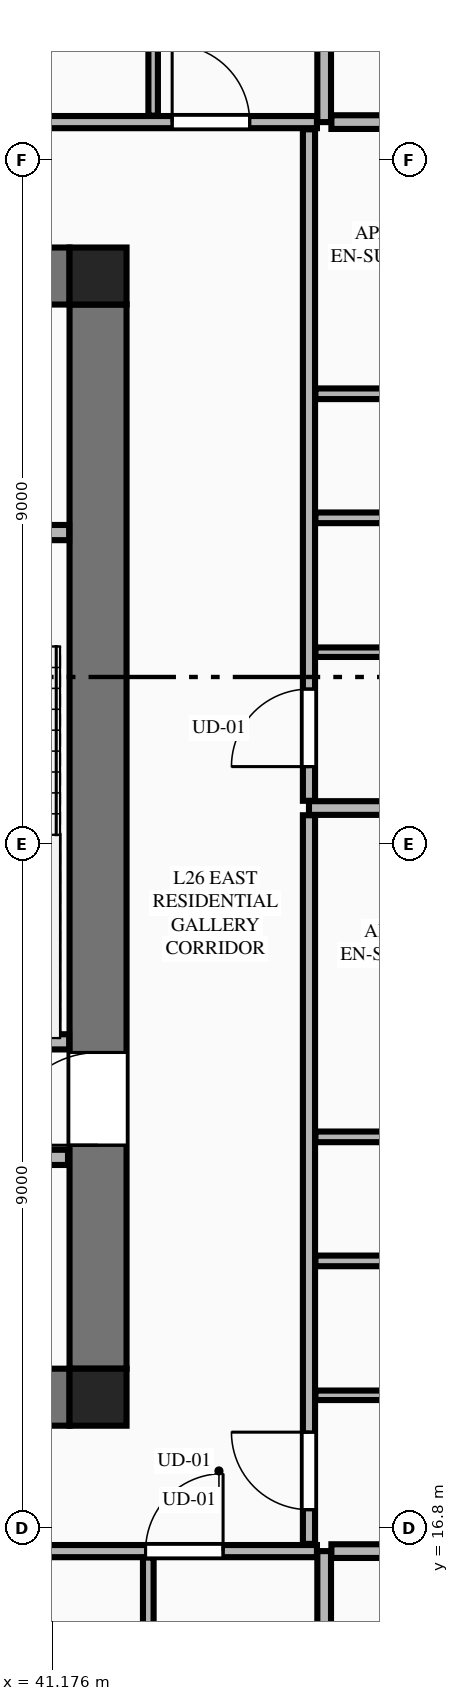
"""IFC4 building model, lengths in metres.
Left out: names, types, materials, properties, quantities, classifications, styles, units other than length and angle.
Written with IfcOpenShell. Run it as: python <this file> out.ifc"""

import sys

from ifc_helpers import new_model, si_unit, direction, frame, frame_2d, origin, origin_2d, place, context, subcontext, project, spatial, rectangle, extrude, element, fill, save


model = new_model("IFC4")
c1 = context("Model", 3, precision=1e-05, world=origin(), true_north=direction((0.0, 1.0)))
c2 = subcontext(c1, "Body", "Model", "MODEL_VIEW")
j1 = project(units=[si_unit("LENGTHUNIT", "METRE"), si_unit("PLANEANGLEUNIT", "RADIAN")], contexts=[c1])
p1 = place(None, origin())
s1 = spatial("IfcSite", under=j1, at=p1, CompositionType="ELEMENT")
p2 = place(p1, origin())
s2 = spatial("IfcBuilding", under=s1, at=p2, CompositionType="ELEMENT")
p3 = place(p2, frame((0.0, 0.0, 101.95)))
s3 = spatial("IfcBuildingStorey", under=s2, at=p3, CompositionType="ELEMENT", Elevation=101.95)
for number, where, z_axis, x_axis in (
    (1, (41.775, 18.525, 0.0), (0.0, 0.0, 1.0), (1.0, 0.0, 0.0)),
    (2, (41.775, 33.275, 0.0), (0.0, 0.0, 1.0), (1.0, 0.0, 0.0)),
):
    element("IfcColumn", number, at=place(p3, frame(where, z_axis=z_axis, x_axis=x_axis)), inside=s3, PredefinedType="COLUMN", context=c2, shape_type="SweptSolid", body=[
        extrude(rectangle(XDim=0.75, YDim=0.75, at=origin_2d()), origin(), (0.0, 0.0, 1.0), 3.55),
    ])
for number, where, z_axis, x_axis in (
    (3, (23.4, 18.525, 0.0), (0.0, 0.0, 1.0), (1.0, 0.0, 0.0)),
    (4, (23.4, 33.275, 0.0), (0.0, 0.0, 1.0), (1.0, 0.0, 0.0)),
):
    element("IfcWall", number, at=place(p3, frame(where, z_axis=z_axis, x_axis=x_axis)), inside=s3, PredefinedType="SHEAR", context=c2, shape_type="SweptSolid", body=[
        extrude(rectangle(XDim=18.0, YDim=0.75, at=frame_2d((9.0, 0.0))), origin(), (0.0, 0.0, 1.0), 3.34),
    ])
p4 = place(p3, frame((41.775, 18.9, 0.0), z_axis=(0.0, 0.0, 1.0), x_axis=(0.0, 1.0, 0.0)))
e5 = element("IfcWall", 5, at=p4, inside=s3, PredefinedType="SHEAR", context=c2, shape_type="SweptSolid", body=[
    extrude(rectangle(XDim=14.0, YDim=0.75, at=frame_2d((7.0, 0.0))), origin(), (0.0, 0.0, 1.0), 3.34),
])
p5 = place(p4, frame((2.94, 0.0, 0.0)))
e6 = element("IfcOpeningElement", 6, at=p5, cuts=e5, PredefinedType="OPENING", context=c2, shape_type="SweptSolid", body=[
    extrude(rectangle(XDim=1.22, YDim=2.25, at=frame_2d((0.61, 1.125))), frame((0.0, 0.385, 0.0), z_axis=(0.0, -1.0, 0.0), x_axis=(1.0, 0.0, 0.0)), (0.0, 0.0, 1.0), 0.77),
])
p6 = place(p3, frame((38.125, 23.2, 0.0), z_axis=(0.0, 0.0, 1.0), x_axis=(1.0, 0.0, 0.0)))
e7 = element("IfcWall", 7, at=p6, inside=s3, PredefinedType="PLUMBINGWALL", context=c2, shape_type="SweptSolid", body=[
    extrude(rectangle(XDim=3.27, YDim=0.2, at=frame_2d((1.635, 0.0))), origin(), (0.0, 0.0, 1.0), 3.34),
])
p7 = place(p3, frame((38.125, 29.9, 0.0), z_axis=(0.0, 0.0, 1.0), x_axis=(1.0, 0.0, 0.0)))
e8 = element("IfcWall", 8, at=p7, inside=s3, PredefinedType="PLUMBINGWALL", context=c2, shape_type="SweptSolid", body=[
    extrude(rectangle(XDim=3.27, YDim=0.2, at=frame_2d((1.635, 0.0))), origin(), (0.0, 0.0, 1.0), 3.34),
])
p8 = place(p7, frame((0.5, 0.0, 0.0)))
e9 = element("IfcOpeningElement", 9, at=p8, cuts=e8, PredefinedType="OPENING", context=c2, shape_type="SweptSolid", body=[
    extrude(rectangle(XDim=0.85, YDim=2.05, at=frame_2d((0.425, 1.025))), frame((0.0, 0.11, 0.0), z_axis=(0.0, -1.0, 0.0), x_axis=(1.0, 0.0, 0.0)), (0.0, 0.0, 1.0), 0.22),
])
p9 = place(p3, frame((23.42, 21.68, 0.0), z_axis=(0.0, 0.0, 1.0), x_axis=(1.0, 0.0, 0.0)))
e10 = element("IfcWall", 10, at=p9, inside=s3, PredefinedType="PLUMBINGWALL", context=c2, shape_type="SweptSolid", body=[
    extrude(rectangle(XDim=17.96, YDim=0.2, at=frame_2d((8.98, 0.0))), origin(), (0.0, 0.0, 1.0), 3.34),
])
p10 = place(p9, frame((11.6, 0.0, 0.0)))
e11 = element("IfcOpeningElement", 11, at=p10, cuts=e10, PredefinedType="OPENING", context=c2, shape_type="SweptSolid", body=[
    extrude(rectangle(XDim=1.1, YDim=2.2, at=frame_2d((0.55, 1.1))), frame((0.0, 0.11, 0.0), z_axis=(0.0, -1.0, 0.0), x_axis=(1.0, 0.0, 0.0)), (0.0, 0.0, 1.0), 0.22),
])
p11 = place(p9, frame((0.41, 0.0, 0.0)))
e12 = element("IfcOpeningElement", 12, at=p11, cuts=e10, PredefinedType="OPENING", context=c2, shape_type="SweptSolid", body=[
    extrude(rectangle(XDim=0.85, YDim=2.05, at=frame_2d((0.425, 1.025))), frame((0.0, 0.11, 0.0), z_axis=(0.0, -1.0, 0.0), x_axis=(1.0, 0.0, 0.0)), (0.0, 0.0, 1.0), 0.22),
])
p12 = place(p9, frame((6.03, 0.0, 0.0)))
e13 = element("IfcOpeningElement", 13, at=p12, cuts=e10, PredefinedType="OPENING", context=c2, shape_type="SweptSolid", body=[
    extrude(rectangle(XDim=0.85, YDim=2.05, at=frame_2d((0.425, 1.025))), frame((0.0, 0.11, 0.0), z_axis=(0.0, -1.0, 0.0), x_axis=(1.0, 0.0, 0.0)), (0.0, 0.0, 1.0), 0.22),
])
p13 = place(p9, frame((13.78, 0.0, 0.0)))
e14 = element("IfcOpeningElement", 14, at=p13, cuts=e10, PredefinedType="OPENING", context=c2, shape_type="SweptSolid", body=[
    extrude(rectangle(XDim=0.85, YDim=2.05, at=frame_2d((0.425, 1.025))), frame((0.0, 0.11, 0.0), z_axis=(0.0, -1.0, 0.0), x_axis=(1.0, 0.0, 0.0)), (0.0, 0.0, 1.0), 0.22),
])
p14 = place(p3, frame((44.75, 4.105, 0.0), z_axis=(0.0, 0.0, 1.0), x_axis=(0.0, 1.0, 0.0)))
e15 = element("IfcWall", 15, at=p14, inside=s3, PredefinedType="PARTITIONING", context=c2, shape_type="SweptSolid", body=[
    extrude(rectangle(XDim=12.395, YDim=0.18, at=frame_2d((6.198, 0.0))), origin(), (0.0, 0.0, 1.0), 3.34),
])
p15 = place(p3, frame((36.327, 16.5, 0.0), z_axis=(0.0, 0.0, 1.0), x_axis=(1.0, 0.0, 0.0)))
e16 = element("IfcWall", 16, at=p15, inside=s3, PredefinedType="PARTITIONING", context=c2, shape_type="SweptSolid", body=[
    extrude(rectangle(XDim=8.328, YDim=0.16, at=frame_2d((4.164, 0.0))), origin(), (0.0, 0.0, 1.0), 3.34),
])
p16 = place(p15, frame((6.073, 0.0, 0.0)))
e17 = element("IfcOpeningElement", 17, at=p16, cuts=e16, PredefinedType="OPENING", context=c2, shape_type="SweptSolid", body=[
    extrude(rectangle(XDim=1.02, YDim=2.25, at=frame_2d((0.51, 1.125))), frame((0.0, 0.09, 0.0), z_axis=(0.0, -1.0, 0.0), x_axis=(1.0, 0.0, 0.0)), (0.0, 0.0, 1.0), 0.18),
])
p17 = place(p3, frame((42.436, 10.036, 0.0), z_axis=(0.0, 0.0, 1.0), x_axis=(0.0, 1.0, 0.0)))
e18 = element("IfcWall", 18, at=p17, inside=s3, PredefinedType="PLUMBINGWALL", context=c2, shape_type="SweptSolid", body=[
    extrude(rectangle(XDim=6.379, YDim=0.14, at=frame_2d((3.189, 0.0))), origin(), (0.0, 0.0, 1.0), 2.722),
])
p18 = place(p3, frame((44.75, 35.3, 0.0), z_axis=(0.0, 0.0, 1.0), x_axis=(0.0, 1.0, 0.0)))
e19 = element("IfcWall", 19, at=p18, inside=s3, PredefinedType="PARTITIONING", context=c2, shape_type="SweptSolid", body=[
    extrude(rectangle(XDim=12.195, YDim=0.18, at=frame_2d((6.098, 0.0))), origin(), (0.0, 0.0, 1.0), 3.34),
])
p19 = place(p3, frame((28.663, 35.3, 0.0), z_axis=(0.0, 0.0, 1.0), x_axis=(1.0, 0.0, 0.0)))
e20 = element("IfcWall", 20, at=p19, inside=s3, PredefinedType="PARTITIONING", context=c2, shape_type="SweptSolid", body=[
    extrude(rectangle(XDim=15.992, YDim=0.16, at=frame_2d((7.996, 0.0))), origin(), (0.0, 0.0, 1.0), 3.34),
])
p20 = place(p19, frame((14.087, 0.0, 0.0)))
e21 = element("IfcOpeningElement", 21, at=p20, cuts=e20, PredefinedType="OPENING", context=c2, shape_type="SweptSolid", body=[
    extrude(rectangle(XDim=1.02, YDim=2.25, at=frame_2d((0.51, 1.125))), frame((0.0, 0.09, 0.0), z_axis=(0.0, -1.0, 0.0), x_axis=(1.0, 0.0, 0.0)), (0.0, 0.0, 1.0), 0.18),
])
p21 = place(p3, frame((42.5, 35.385, 0.0), z_axis=(0.0, 0.0, 1.0), x_axis=(0.0, 1.0, 0.0)))
e22 = element("IfcWall", 22, at=p21, inside=s3, PredefinedType="PARTITIONING", context=c2, shape_type="SweptSolid", body=[
    extrude(rectangle(XDim=5.42, YDim=0.125, at=frame_2d((2.71, 0.0))), origin(), (0.0, 0.0, 1.0), 2.722),
])
p22 = place(p3, frame((44.845, 16.5, 0.0), z_axis=(0.0, 0.0, 1.0), x_axis=(1.0, 0.0, 0.0)))
e23 = element("IfcWall", 23, at=p22, inside=s3, PredefinedType="PARTITIONING", context=c2, shape_type="SweptSolid", body=[
    extrude(rectangle(XDim=7.77, YDim=0.18, at=frame_2d((3.885, 0.0))), origin(), (0.0, 0.0, 1.0), 3.34),
])
p23 = place(p3, frame((44.845, 35.3, 0.0), z_axis=(0.0, 0.0, 1.0), x_axis=(1.0, 0.0, 0.0)))
e24 = element("IfcWall", 24, at=p23, inside=s3, PredefinedType="PARTITIONING", context=c2, shape_type="SweptSolid", body=[
    extrude(rectangle(XDim=7.669, YDim=0.18, at=frame_2d((3.834, 0.0))), origin(), (0.0, 0.0, 1.0), 3.34),
])
p24 = place(p3, frame((44.55, 16.595, 0.0), z_axis=(0.0, 0.0, 1.0), x_axis=(0.0, 1.0, 0.0)))
e25 = element("IfcWall", 25, at=p24, inside=s3, PredefinedType="PARTITIONING", context=c2, shape_type="SweptSolid", body=[
    extrude(rectangle(XDim=9.586, YDim=0.16, at=frame_2d((4.793, 0.0))), origin(), (0.0, 0.0, 1.0), 3.34),
])
p25 = place(p24, frame((0.45, 0.0, 0.0)))
e26 = element("IfcOpeningElement", 26, at=p25, cuts=e25, PredefinedType="OPENING", context=c2, shape_type="SweptSolid", body=[
    extrude(rectangle(XDim=1.02, YDim=2.25, at=frame_2d((0.51, 1.125))), frame((0.0, 0.09, 0.0), z_axis=(0.0, -1.0, 0.0), x_axis=(1.0, 0.0, 0.0)), (0.0, 0.0, 1.0), 0.18),
])
p26 = place(p3, frame((44.635, 18.55, 0.0), z_axis=(0.0, 0.0, 1.0), x_axis=(1.0, 0.0, 0.0)))
e27 = element("IfcWall", 27, at=p26, inside=s3, PredefinedType="PARTITIONING", context=c2, shape_type="SweptSolid", body=[
    extrude(rectangle(XDim=3.38, YDim=0.125, at=frame_2d((1.69, 0.0))), origin(), (0.0, 0.0, 1.0), 2.722),
])
for number, where, z_axis, x_axis in (
    (28, (44.635, 21.95, 0.0), (0.0, 0.0, 1.0), (1.0, 0.0, 0.0)),
    (29, (44.635, 20.318, 0.0), (0.0, 0.0, 1.0), (1.0, 0.0, 0.0)),
):
    element("IfcWall", number, at=place(p3, frame(where, z_axis=z_axis, x_axis=x_axis)), inside=s3, PredefinedType="PLUMBINGWALL", context=c2, shape_type="SweptSolid", body=[
        extrude(rectangle(XDim=3.38, YDim=0.14, at=frame_2d((1.69, 0.0))), origin(), (0.0, 0.0, 1.0), 3.34),
    ])
p27 = place(p3, frame((44.55, 26.276, 0.0), z_axis=(0.0, 0.0, 1.0), x_axis=(1.0, 0.0, 0.0)))
e30 = element("IfcWall", 30, at=p27, inside=s3, PredefinedType="PARTITIONING", context=c2, shape_type="SweptSolid", body=[
    extrude(rectangle(XDim=12.308, YDim=0.18, at=frame_2d((6.154, 0.0))), origin(), (0.0, 0.0, 1.0), 3.34),
])
p28 = place(p3, frame((44.55, 26.371, 0.0), z_axis=(0.0, 0.0, 1.0), x_axis=(0.0, 1.0, 0.0)))
e31 = element("IfcWall", 31, at=p28, inside=s3, PredefinedType="PARTITIONING", context=c2, shape_type="SweptSolid", body=[
    extrude(rectangle(XDim=8.834, YDim=0.16, at=frame_2d((4.417, 0.0))), origin(), (0.0, 0.0, 1.0), 3.34),
])
p29 = place(p28, frame((0.45, 0.0, 0.0)))
e32 = element("IfcOpeningElement", 32, at=p29, cuts=e31, PredefinedType="OPENING", context=c2, shape_type="SweptSolid", body=[
    extrude(rectangle(XDim=1.02, YDim=2.25, at=frame_2d((0.51, 1.125))), frame((0.0, 0.09, 0.0), z_axis=(0.0, -1.0, 0.0), x_axis=(1.0, 0.0, 0.0)), (0.0, 0.0, 1.0), 0.18),
])
p30 = place(p3, frame((44.635, 28.326, 0.0), z_axis=(0.0, 0.0, 1.0), x_axis=(1.0, 0.0, 0.0)))
e33 = element("IfcWall", 33, at=p30, inside=s3, PredefinedType="PARTITIONING", context=c2, shape_type="SweptSolid", body=[
    extrude(rectangle(XDim=3.38, YDim=0.125, at=frame_2d((1.69, 0.0))), origin(), (0.0, 0.0, 1.0), 3.34),
])
for number, where, z_axis, x_axis in (
    (34, (44.635, 31.726, 0.0), (0.0, 0.0, 1.0), (1.0, 0.0, 0.0)),
    (35, (44.635, 30.094, 0.0), (0.0, 0.0, 1.0), (1.0, 0.0, 0.0)),
):
    element("IfcWall", number, at=place(p3, frame(where, z_axis=z_axis, x_axis=x_axis)), inside=s3, PredefinedType="PLUMBINGWALL", context=c2, shape_type="SweptSolid", body=[
        extrude(rectangle(XDim=3.38, YDim=0.14, at=frame_2d((1.69, 0.0))), origin(), (0.0, 0.0, 1.0), 3.34),
    ])
p31 = place(p5, origin())
e36 = element("IfcDoor", 36, at=p31, inside=s3, OperationType="SINGLE_SWING_LEFT", PredefinedType="DOOR", context=c2, shape_type="SweptSolid", body=[
    extrude(rectangle(XDim=1.22, YDim=2.25, at=frame_2d((0.61, 1.125))), frame((0.0, 0.025, 0.0), z_axis=(0.0, -1.0, 0.0), x_axis=(1.0, 0.0, 0.0)), (0.0, 0.0, 1.0), 0.05),
])
fill(e6, e36)
p32 = place(p16, origin())
e37 = element("IfcDoor", 37, at=p32, inside=s3, OperationType="SINGLE_SWING_RIGHT", PredefinedType="DOOR", context=c2, shape_type="SweptSolid", body=[
    extrude(rectangle(XDim=1.02, YDim=2.25, at=frame_2d((0.51, 1.125))), frame((0.0, 0.025, 0.0), z_axis=(0.0, -1.0, 0.0), x_axis=(1.0, 0.0, 0.0)), (0.0, 0.0, 1.0), 0.05),
])
fill(e17, e37)
p33 = place(p20, origin())
e38 = element("IfcDoor", 38, at=p33, inside=s3, OperationType="SINGLE_SWING_LEFT", PredefinedType="DOOR", context=c2, shape_type="SweptSolid", body=[
    extrude(rectangle(XDim=1.02, YDim=2.25, at=frame_2d((0.51, 1.125))), frame((0.0, 0.025, 0.0), z_axis=(0.0, -1.0, 0.0), x_axis=(1.0, 0.0, 0.0)), (0.0, 0.0, 1.0), 0.05),
])
fill(e21, e38)
p34 = place(p25, origin())
e39 = element("IfcDoor", 39, at=p34, inside=s3, OperationType="SINGLE_SWING_RIGHT", PredefinedType="DOOR", context=c2, shape_type="SweptSolid", body=[
    extrude(rectangle(XDim=1.02, YDim=2.25, at=frame_2d((0.51, 1.125))), frame((0.0, 0.025, 0.0), z_axis=(0.0, -1.0, 0.0), x_axis=(1.0, 0.0, 0.0)), (0.0, 0.0, 1.0), 0.05),
])
fill(e26, e39)
p35 = place(p29, origin())
e40 = element("IfcDoor", 40, at=p35, inside=s3, OperationType="SINGLE_SWING_LEFT", PredefinedType="DOOR", context=c2, shape_type="SweptSolid", body=[
    extrude(rectangle(XDim=1.02, YDim=2.25, at=frame_2d((0.51, 1.125))), frame((0.0, 0.025, 0.0), z_axis=(0.0, -1.0, 0.0), x_axis=(1.0, 0.0, 0.0)), (0.0, 0.0, 1.0), 0.05),
])
fill(e32, e40)
save(model, sys.argv[1])
